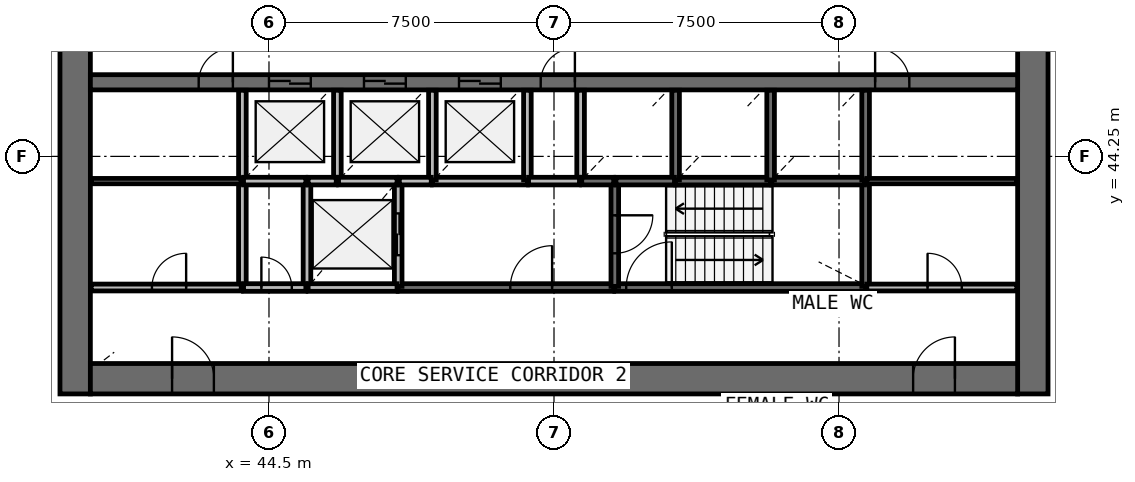
"""IFC4 building model, lengths in metres.
Left out: names, types, materials, properties, quantities, classifications, styles, units other than length and angle.
Written with IfcOpenShell. Run it as: python <this file> out.ifc"""

import sys

from ifc_helpers import new_model, si_unit, direction, frame, frame_2d, origin, place, context, subcontext, project, spatial, rectangle, extrude, source, transform, mapped, element, fill, save


model = new_model("IFC4")
c1 = context("Model", 3, precision=1e-05, world=origin(), true_north=direction((0.0, 1.0)))
c2 = subcontext(c1, "Body", "Model", "MODEL_VIEW")
j1 = project(units=[si_unit("LENGTHUNIT", "METRE"), si_unit("PLANEANGLEUNIT", "RADIAN")], contexts=[c1])
p1 = place(None, origin())
s1 = spatial("IfcSite", under=j1, at=p1, CompositionType="ELEMENT")
p2 = place(p1, origin())
s2 = spatial("IfcBuilding", under=s1, at=p2, CompositionType="ELEMENT")
p3 = place(p2, frame((0.0, 0.0, 104.4)))
s3 = spatial("IfcBuildingStorey", under=s2, at=p3, CompositionType="ELEMENT", Elevation=104.4)
p4 = place(p3, frame((64.6, 38.0, 0.0), z_axis=(0.0, 0.0, 1.0), x_axis=(0.0, 1.0, 0.0)))
e1 = element("IfcWall", 1, at=p4, inside=s3, PredefinedType="SHEAR", context=c2, shape_type="SweptSolid", body=[
    extrude(rectangle(XDim=20.0, YDim=0.8, at=frame_2d((10.0, 0.0))), origin(), (0.0, 0.0, 1.0), 4.1),
])
p5 = place(p4, frame((9.1, 0.0, 0.0)))
e2 = element("IfcOpeningElement", 2, at=p5, cuts=e1, PredefinedType="OPENING", context=c2, shape_type="SweptSolid", body=[
    extrude(rectangle(XDim=1.8, YDim=2.1, at=frame_2d((0.9, 1.05))), frame((0.0, 0.41, 0.0), z_axis=(0.0, -1.0, 0.0), x_axis=(1.0, 0.0, 0.0)), (0.0, 0.0, 1.0), 0.82),
])
p6 = place(p3, frame((39.4, 58.0, 0.0), z_axis=(0.0, 0.0, 1.0), x_axis=(0.0, -1.0, 0.0)))
e3 = element("IfcWall", 3, at=p6, inside=s3, PredefinedType="SHEAR", context=c2, shape_type="SweptSolid", body=[
    extrude(rectangle(XDim=20.0, YDim=0.8, at=frame_2d((10.0, 0.0))), origin(), (0.0, 0.0, 1.0), 4.1),
])
p7 = place(p6, frame((9.1, 0.0, 0.0)))
e4 = element("IfcOpeningElement", 4, at=p7, cuts=e3, PredefinedType="OPENING", context=c2, shape_type="SweptSolid", body=[
    extrude(rectangle(XDim=1.8, YDim=2.1, at=frame_2d((0.9, 1.05))), frame((0.0, 0.41, 0.0), z_axis=(0.0, -1.0, 0.0), x_axis=(1.0, 0.0, 0.0)), (0.0, 0.0, 1.0), 0.82),
])
p8 = place(p3, frame((39.8, 38.4, 0.0), z_axis=(0.0, 0.0, 1.0), x_axis=(1.0, 0.0, 0.0)))
e5 = element("IfcWall", 5, at=p8, inside=s3, PredefinedType="SHEAR", context=c2, shape_type="SweptSolid", body=[
    extrude(rectangle(XDim=24.4, YDim=0.8, at=frame_2d((12.2, 0.0))), origin(), (0.0, 0.0, 1.0), 4.1),
])
p9 = place(p8, frame((21.65, 0.0, 0.0)))
e6 = element("IfcOpeningElement", 6, at=p9, cuts=e5, PredefinedType="OPENING", context=c2, shape_type="SweptSolid", body=[
    extrude(rectangle(XDim=1.1, YDim=2.1, at=frame_2d((0.55, 1.05))), frame((0.0, 0.41, 0.0), z_axis=(0.0, -1.0, 0.0), x_axis=(1.0, 0.0, 0.0)), (0.0, 0.0, 1.0), 0.82),
])
p10 = place(p8, frame((2.15, 0.0, 0.0)))
e7 = element("IfcOpeningElement", 7, at=p10, cuts=e5, PredefinedType="OPENING", context=c2, shape_type="SweptSolid", body=[
    extrude(rectangle(XDim=1.1, YDim=2.1, at=frame_2d((0.55, 1.05))), frame((0.0, 0.41, 0.0), z_axis=(0.0, -1.0, 0.0), x_axis=(1.0, 0.0, 0.0)), (0.0, 0.0, 1.0), 0.82),
])
p11 = place(p3, frame((39.8, 46.2, 0.0), z_axis=(0.0, 0.0, 1.0), x_axis=(1.0, 0.0, 0.0)))
e8 = element("IfcWall", 8, at=p11, inside=s3, PredefinedType="SHEAR", context=c2, shape_type="SweptSolid", body=[
    extrude(rectangle(XDim=24.4, YDim=0.4, at=frame_2d((12.2, 0.0))), origin(), (0.0, 0.0, 1.0), 4.1),
])
p12 = place(p11, frame((4.7, 0.0, 0.0)))
e9 = element("IfcOpeningElement", 9, at=p12, cuts=e8, PredefinedType="OPENING", context=c2, shape_type="SweptSolid", body=[
    extrude(rectangle(XDim=1.1, YDim=2.1, at=frame_2d((0.55, 1.05))), frame((0.0, 0.21, 0.0), z_axis=(0.0, -1.0, 0.0), x_axis=(1.0, 0.0, 0.0)), (0.0, 0.0, 1.0), 0.42),
])
p13 = place(p11, frame((7.2, 0.0, 0.0)))
e10 = element("IfcOpeningElement", 10, at=p13, cuts=e8, PredefinedType="OPENING", context=c2, shape_type="SweptSolid", body=[
    extrude(rectangle(XDim=1.1, YDim=2.1, at=frame_2d((0.55, 1.05))), frame((0.0, 0.21, 0.0), z_axis=(0.0, -1.0, 0.0), x_axis=(1.0, 0.0, 0.0)), (0.0, 0.0, 1.0), 0.42),
])
p14 = place(p11, frame((9.7, 0.0, 0.0)))
e11 = element("IfcOpeningElement", 11, at=p14, cuts=e8, PredefinedType="OPENING", context=c2, shape_type="SweptSolid", body=[
    extrude(rectangle(XDim=1.1, YDim=2.1, at=frame_2d((0.55, 1.05))), frame((0.0, 0.21, 0.0), z_axis=(0.0, -1.0, 0.0), x_axis=(1.0, 0.0, 0.0)), (0.0, 0.0, 1.0), 0.42),
])
p15 = place(p11, frame((20.65, 0.0, 0.0)))
e12 = element("IfcOpeningElement", 12, at=p15, cuts=e8, PredefinedType="OPENING", context=c2, shape_type="SweptSolid", body=[
    extrude(rectangle(XDim=0.9, YDim=2.1, at=frame_2d((0.45, 1.05))), frame((0.0, 0.21, 0.0), z_axis=(0.0, -1.0, 0.0), x_axis=(1.0, 0.0, 0.0)), (0.0, 0.0, 1.0), 0.42),
])
p16 = place(p11, frame((2.85, 0.0, 0.0)))
e13 = element("IfcOpeningElement", 13, at=p16, cuts=e8, PredefinedType="OPENING", context=c2, shape_type="SweptSolid", body=[
    extrude(rectangle(XDim=0.9, YDim=2.1, at=frame_2d((0.45, 1.05))), frame((0.0, 0.21, 0.0), z_axis=(0.0, -1.0, 0.0), x_axis=(1.0, 0.0, 0.0)), (0.0, 0.0, 1.0), 0.42),
])
p17 = place(p11, frame((11.85, 0.0, 0.0)))
e14 = element("IfcOpeningElement", 14, at=p17, cuts=e8, PredefinedType="OPENING", context=c2, shape_type="SweptSolid", body=[
    extrude(rectangle(XDim=0.9, YDim=2.1, at=frame_2d((0.45, 1.05))), frame((0.0, 0.21, 0.0), z_axis=(0.0, -1.0, 0.0), x_axis=(1.0, 0.0, 0.0)), (0.0, 0.0, 1.0), 0.42),
])
p18 = place(p3, frame((53.6, 40.8, 0.0), z_axis=(0.0, 0.0, 1.0), x_axis=(1.0, 0.0, 0.0)))
e15 = element("IfcWall", 15, at=p18, inside=s3, PredefinedType="SOLIDWALL", context=c2, shape_type="SweptSolid", body=[
    extrude(rectangle(XDim=6.6, YDim=0.2, at=frame_2d((3.3, 0.0))), origin(), (0.0, 0.0, 1.0), 3.7),
])
p19 = place(p18, frame((0.3, 0.0, 0.0)))
e16 = element("IfcOpeningElement", 16, at=p19, cuts=e15, PredefinedType="OPENING", context=c2, shape_type="SweptSolid", body=[
    extrude(rectangle(XDim=1.2, YDim=2.1, at=frame_2d((0.6, 1.05))), frame((0.0, 0.11, 0.0), z_axis=(0.0, -1.0, 0.0), x_axis=(1.0, 0.0, 0.0)), (0.0, 0.0, 1.0), 0.22),
])
p20 = place(p3, frame((47.9, 40.8, 0.0), z_axis=(0.0, 0.0, 1.0), x_axis=(1.0, 0.0, 0.0)))
e17 = element("IfcWall", 17, at=p20, inside=s3, PredefinedType="SOLIDWALL", context=c2, shape_type="SweptSolid", body=[
    extrude(rectangle(XDim=5.67, YDim=0.2, at=frame_2d((2.835, 0.0))), origin(), (0.0, 0.0, 1.0), 3.7),
])
p21 = place(p20, frame((2.95, 0.0, 0.0)))
e18 = element("IfcOpeningElement", 18, at=p21, cuts=e17, PredefinedType="OPENING", context=c2, shape_type="SweptSolid", body=[
    extrude(rectangle(XDim=1.1, YDim=2.1, at=frame_2d((0.55, 1.05))), frame((0.0, 0.11, 0.0), z_axis=(0.0, -1.0, 0.0), x_axis=(1.0, 0.0, 0.0)), (0.0, 0.0, 1.0), 0.22),
])
for number, where, z_axis, x_axis in (
    (19, (43.8, 43.6, 0.0), (0.0, 0.0, 1.0), (0.0, -1.0, 0.0)),
    (20, (45.5, 43.6, 0.0), (0.0, 0.0, 1.0), (0.0, -1.0, 0.0)),
):
    element("IfcWall", number, at=place(p3, frame(where, z_axis=z_axis, x_axis=x_axis)), inside=s3, PredefinedType="SOLIDWALL", context=c2, shape_type="SweptSolid", body=[
        extrude(rectangle(XDim=2.8, YDim=0.2, at=frame_2d((1.4, 0.0))), origin(), (0.0, 0.0, 1.0), 3.7),
    ])
p22 = place(p3, frame((47.9, 40.83, 0.0), z_axis=(0.0, 0.0, 1.0), x_axis=(0.0, 1.0, 0.0)))
e21 = element("IfcWall", 21, at=p22, inside=s3, PredefinedType="SOLIDWALL", context=c2, shape_type="SweptSolid", body=[
    extrude(rectangle(XDim=2.77, YDim=0.2, at=frame_2d((1.385, 0.0))), origin(), (0.0, 0.0, 1.0), 3.7),
])
p23 = place(p22, frame((0.82, 0.0, 0.0)))
e22 = element("IfcOpeningElement", 22, at=p23, cuts=e21, PredefinedType="OPENING", context=c2, shape_type="SweptSolid", body=[
    extrude(rectangle(XDim=1.1, YDim=2.1, at=frame_2d((0.55, 1.05))), frame((0.0, 0.11, 0.0), z_axis=(0.0, -1.0, 0.0), x_axis=(1.0, 0.0, 0.0)), (0.0, 0.0, 1.0), 0.22),
])
p24 = place(p3, frame((60.2, 40.83, 0.0), z_axis=(0.0, 0.0, 1.0), x_axis=(0.0, 1.0, 0.0)))
e23 = element("IfcWall", 23, at=p24, inside=s3, PredefinedType="SOLIDWALL", context=c2, shape_type="SweptSolid", body=[
    extrude(rectangle(XDim=2.77, YDim=0.2, at=frame_2d((1.385, 0.0))), origin(), (0.0, 0.0, 1.0), 3.7),
])
p25 = place(p3, frame((53.6, 43.6, 0.0), z_axis=(0.0, 0.0, 1.0), x_axis=(0.0, -1.0, 0.0)))
e24 = element("IfcWall", 24, at=p25, inside=s3, PredefinedType="SOLIDWALL", context=c2, shape_type="SweptSolid", body=[
    extrude(rectangle(XDim=2.77, YDim=0.2, at=frame_2d((1.385, 0.0))), origin(), (0.0, 0.0, 1.0), 3.7),
])
p26 = place(p25, frame((0.9, 0.0, 0.0)))
e25 = element("IfcOpeningElement", 25, at=p26, cuts=e24, PredefinedType="OPENING", context=c2, shape_type="SweptSolid", body=[
    extrude(rectangle(XDim=1.0, YDim=2.1, at=frame_2d((0.5, 1.05))), frame((0.0, 0.11, 0.0), z_axis=(0.0, -1.0, 0.0), x_axis=(1.0, 0.0, 0.0)), (0.0, 0.0, 1.0), 0.22),
])
for number, where, z_axis, x_axis in (
    (26, (48.8, 43.6, 0.0), (0.0, 0.0, 1.0), (1.0, 0.0, 0.0)),
    (27, (55.2, 43.6, 0.0), (0.0, 0.0, 1.0), (1.0, 0.0, 0.0)),
):
    element("IfcWall", number, at=place(p3, frame(where, z_axis=z_axis, x_axis=x_axis)), inside=s3, PredefinedType="SOLIDWALL", context=c2, shape_type="SweptSolid", body=[
        extrude(rectangle(XDim=2.5, YDim=0.2, at=frame_2d((1.25, 0.0))), origin(), (0.0, 0.0, 1.0), 3.7),
    ])
p27 = place(p3, frame((57.73, 43.6, 0.0), z_axis=(0.0, 0.0, 1.0), x_axis=(1.0, 0.0, 0.0)))
e28 = element("IfcWall", 28, at=p27, inside=s3, PredefinedType="SOLIDWALL", context=c2, shape_type="SweptSolid", body=[
    extrude(rectangle(XDim=2.44, YDim=0.2, at=frame_2d((1.22, 0.0))), origin(), (0.0, 0.0, 1.0), 3.7),
])
p28 = place(p3, frame((45.53, 40.8, 0.0), z_axis=(0.0, 0.0, 1.0), x_axis=(1.0, 0.0, 0.0)))
e29 = element("IfcWall", 29, at=p28, inside=s3, PredefinedType="SOLIDWALL", context=c2, shape_type="SweptSolid", body=[
    extrude(rectangle(XDim=2.34, YDim=0.2, at=frame_2d((1.17, 0.0))), origin(), (0.0, 0.0, 1.0), 3.7),
])
p29 = place(p3, frame((43.8, 45.99, 0.0), z_axis=(0.0, 0.0, 1.0), x_axis=(0.0, -1.0, 0.0)))
e30 = element("IfcWall", 30, at=p29, inside=s3, PredefinedType="SOLIDWALL", context=c2, shape_type="SweptSolid", body=[
    extrude(rectangle(XDim=2.36, YDim=0.2, at=frame_2d((1.18, 0.0))), origin(), (0.0, 0.0, 1.0), 3.7),
])
p30 = place(p3, frame((46.3, 43.6, 0.0), z_axis=(0.0, 0.0, 1.0), x_axis=(0.0, 1.0, 0.0)))
e31 = element("IfcWall", 31, at=p30, inside=s3, PredefinedType="SOLIDWALL", context=c2, shape_type="SweptSolid", body=[
    extrude(rectangle(XDim=2.39, YDim=0.2, at=frame_2d((1.195, 0.0))), origin(), (0.0, 0.0, 1.0), 3.7),
])
for number, where, z_axis, x_axis in (
    (32, (48.8, 43.63, 0.0), (0.0, 0.0, 1.0), (0.0, 1.0, 0.0)),
    (33, (51.3, 43.63, 0.0), (0.0, 0.0, 1.0), (0.0, 1.0, 0.0)),
):
    element("IfcWall", number, at=place(p3, frame(where, z_axis=z_axis, x_axis=x_axis)), inside=s3, PredefinedType="SOLIDWALL", context=c2, shape_type="SweptSolid", body=[
        extrude(rectangle(XDim=2.36, YDim=0.2, at=frame_2d((1.18, 0.0))), origin(), (0.0, 0.0, 1.0), 3.7),
    ])
p31 = place(p3, frame((52.7, 45.99, 0.0), z_axis=(0.0, 0.0, 1.0), x_axis=(0.0, -1.0, 0.0)))
e34 = element("IfcWall", 34, at=p31, inside=s3, PredefinedType="SOLIDWALL", context=c2, shape_type="SweptSolid", body=[
    extrude(rectangle(XDim=2.39, YDim=0.2, at=frame_2d((1.195, 0.0))), origin(), (0.0, 0.0, 1.0), 3.7),
])
for number, where, z_axis, x_axis in (
    (35, (55.2, 43.63, 0.0), (0.0, 0.0, 1.0), (0.0, 1.0, 0.0)),
    (36, (57.7, 43.63, 0.0), (0.0, 0.0, 1.0), (0.0, 1.0, 0.0)),
    (37, (60.2, 43.63, 0.0), (0.0, 0.0, 1.0), (0.0, 1.0, 0.0)),
):
    element("IfcWall", number, at=place(p3, frame(where, z_axis=z_axis, x_axis=x_axis)), inside=s3, PredefinedType="SOLIDWALL", context=c2, shape_type="SweptSolid", body=[
        extrude(rectangle(XDim=2.36, YDim=0.2, at=frame_2d((1.18, 0.0))), origin(), (0.0, 0.0, 1.0), 3.7),
    ])
p32 = place(p3, frame((43.83, 43.6, 0.0), z_axis=(0.0, 0.0, 1.0), x_axis=(1.0, 0.0, 0.0)))
e38 = element("IfcWall", 38, at=p32, inside=s3, PredefinedType="SOLIDWALL", context=c2, shape_type="SweptSolid", body=[
    extrude(rectangle(XDim=1.64, YDim=0.2, at=frame_2d((0.82, 0.0))), origin(), (0.0, 0.0, 1.0), 3.7),
])
p33 = place(p3, frame((43.83, 40.8, 0.0), z_axis=(0.0, 0.0, 1.0), x_axis=(1.0, 0.0, 0.0)))
e39 = element("IfcWall", 39, at=p33, inside=s3, PredefinedType="SOLIDWALL", context=c2, shape_type="SweptSolid", body=[
    extrude(rectangle(XDim=1.64, YDim=0.2, at=frame_2d((0.82, 0.0))), origin(), (0.0, 0.0, 1.0), 3.7),
])
p34 = place(p33, frame((0.47, 0.0, 0.0)))
e40 = element("IfcOpeningElement", 40, at=p34, cuts=e39, PredefinedType="OPENING", context=c2, shape_type="SweptSolid", body=[
    extrude(rectangle(XDim=0.8, YDim=2.1, at=frame_2d((0.4, 1.05))), frame((0.0, 0.11, 0.0), z_axis=(0.0, -1.0, 0.0), x_axis=(1.0, 0.0, 0.0)), (0.0, 0.0, 1.0), 0.22),
])
for number, where, z_axis, x_axis in (
    (41, (46.33, 43.6, 0.0), (0.0, 0.0, 1.0), (1.0, 0.0, 0.0)),
    (42, (53.63, 43.6, 0.0), (0.0, 0.0, 1.0), (1.0, 0.0, 0.0)),
):
    element("IfcWall", number, at=place(p3, frame(where, z_axis=z_axis, x_axis=x_axis)), inside=s3, PredefinedType="SOLIDWALL", context=c2, shape_type="SweptSolid", body=[
        extrude(rectangle(XDim=1.54, YDim=0.2, at=frame_2d((0.77, 0.0))), origin(), (0.0, 0.0, 1.0), 3.7),
    ])
p35 = place(p3, frame((52.67, 43.6, 0.0), z_axis=(0.0, 0.0, 1.0), x_axis=(-1.0, 0.0, 0.0)))
e43 = element("IfcWall", 43, at=p35, inside=s3, PredefinedType="SOLIDWALL", context=c2, shape_type="SweptSolid", body=[
    extrude(rectangle(XDim=1.34, YDim=0.2, at=frame_2d((0.67, 0.0))), origin(), (0.0, 0.0, 1.0), 3.7),
])
for number, where, z_axis, x_axis in (
    (44, (47.93, 43.6, 0.0), (0.0, 0.0, 1.0), (1.0, 0.0, 0.0)),
    (45, (52.73, 43.6, 0.0), (0.0, 0.0, 1.0), (1.0, 0.0, 0.0)),
):
    element("IfcWall", number, at=place(p3, frame(where, z_axis=z_axis, x_axis=x_axis)), inside=s3, PredefinedType="SOLIDWALL", context=c2, shape_type="SweptSolid", body=[
        extrude(rectangle(XDim=0.84, YDim=0.2, at=frame_2d((0.42, 0.0))), origin(), (0.0, 0.0, 1.0), 3.7),
    ])
p36 = place(p3, frame((45.53, 43.6, 0.0), z_axis=(0.0, 0.0, 1.0), x_axis=(1.0, 0.0, 0.0)))
e46 = element("IfcWall", 46, at=p36, inside=s3, PredefinedType="SOLIDWALL", context=c2, shape_type="SweptSolid", body=[
    extrude(rectangle(XDim=0.74, YDim=0.2, at=frame_2d((0.37, 0.0))), origin(), (0.0, 0.0, 1.0), 3.7),
])
p37 = place(p3, frame((60.23, 40.8, 0.0), z_axis=(0.0, 0.0, 1.0), x_axis=(1.0, 0.0, 0.0)))
e47 = element("IfcWall", 47, at=p37, inside=s3, PredefinedType="PARTITIONING", context=c2, shape_type="SweptSolid", body=[
    extrude(rectangle(XDim=3.95, YDim=0.18, at=frame_2d((1.975, 0.0))), origin(), (0.0, 0.0, 1.0), 3.7),
])
p38 = place(p37, frame((1.6, 0.0, 0.0)))
e48 = element("IfcOpeningElement", 48, at=p38, cuts=e47, PredefinedType="OPENING", context=c2, shape_type="SweptSolid", body=[
    extrude(rectangle(XDim=0.9, YDim=2.1, at=frame_2d((0.45, 1.05))), frame((0.0, 0.1, 0.0), z_axis=(0.0, -1.0, 0.0), x_axis=(1.0, 0.0, 0.0)), (0.0, 0.0, 1.0), 0.2),
])
p39 = place(p3, frame((39.82, 40.8, 0.0), z_axis=(0.0, 0.0, 1.0), x_axis=(1.0, 0.0, 0.0)))
e49 = element("IfcWall", 49, at=p39, inside=s3, PredefinedType="PARTITIONING", context=c2, shape_type="SweptSolid", body=[
    extrude(rectangle(XDim=3.95, YDim=0.18, at=frame_2d((1.975, 0.0))), origin(), (0.0, 0.0, 1.0), 3.7),
])
p40 = place(p39, frame((1.6, 0.0, 0.0)))
e50 = element("IfcOpeningElement", 50, at=p40, cuts=e49, PredefinedType="OPENING", context=c2, shape_type="SweptSolid", body=[
    extrude(rectangle(XDim=0.9, YDim=2.1, at=frame_2d((0.45, 1.05))), frame((0.0, 0.1, 0.0), z_axis=(0.0, -1.0, 0.0), x_axis=(1.0, 0.0, 0.0)), (0.0, 0.0, 1.0), 0.2),
])
for number, where, z_axis, x_axis in (
    (51, (60.23, 43.6, 0.0), (0.0, 0.0, 1.0), (1.0, 0.0, 0.0)),
    (52, (43.77, 43.6, 0.0), (0.0, 0.0, 1.0), (-1.0, 0.0, 0.0)),
):
    element("IfcWall", number, at=place(p3, frame(where, z_axis=z_axis, x_axis=x_axis)), inside=s3, PredefinedType="PARTITIONING", context=c2, shape_type="SweptSolid", body=[
        extrude(rectangle(XDim=3.95, YDim=0.14, at=frame_2d((1.975, 0.0))), origin(), (0.0, 0.0, 1.0), 2.9),
    ])
m1 = source(origin(), c2, "Body", "SweptSolid", [
    extrude(rectangle(XDim=1.1, YDim=2.1, at=frame_2d((0.55, 1.05))), frame((0.0, 0.025, 0.0), z_axis=(0.0, -1.0, 0.0), x_axis=(1.0, 0.0, 0.0)), (0.0, 0.0, 1.0), 0.05),
])
p41 = place(p12, origin())
e53 = element("IfcDoor", 53, at=p41, inside=s3, OperationType="DOUBLE_DOOR_SLIDING", PredefinedType="USERDEFINED", context=c2, shape_type="MappedRepresentation", body=[
    mapped(m1, transform((0.0, 0.0, 0.0), scale=1.0)),
])
fill(e9, e53)
p42 = place(p13, origin())
e54 = element("IfcDoor", 54, at=p42, inside=s3, OperationType="DOUBLE_DOOR_SLIDING", PredefinedType="USERDEFINED", context=c2, shape_type="MappedRepresentation", body=[
    mapped(m1, transform((0.0, 0.0, 0.0), scale=1.0)),
])
fill(e10, e54)
p43 = place(p14, origin())
e55 = element("IfcDoor", 55, at=p43, inside=s3, OperationType="DOUBLE_DOOR_SLIDING", PredefinedType="USERDEFINED", context=c2, shape_type="MappedRepresentation", body=[
    mapped(m1, transform((0.0, 0.0, 0.0), scale=1.0)),
])
fill(e11, e55)
p44 = place(p23, origin())
e56 = element("IfcDoor", 56, at=p44, inside=s3, OperationType="DOUBLE_DOOR_SLIDING", PredefinedType="USERDEFINED", context=c2, shape_type="MappedRepresentation", body=[
    mapped(m1, transform((0.0, 0.0, 0.0), scale=1.0)),
])
fill(e22, e56)
m2 = source(origin(), c2, "Body", "SweptSolid", [
    extrude(rectangle(XDim=1.2, YDim=2.1, at=frame_2d((0.6, 1.05))), frame((0.0, 0.025, 0.0), z_axis=(0.0, -1.0, 0.0), x_axis=(1.0, 0.0, 0.0)), (0.0, 0.0, 1.0), 0.05),
])
p45 = place(p19, origin())
e57 = element("IfcDoor", 57, at=p45, inside=s3, OperationType="SINGLE_SWING_RIGHT", PredefinedType="DOOR", context=c2, shape_type="MappedRepresentation", body=[
    mapped(m2, transform((0.0, 0.0, 0.0), scale=1.0)),
])
fill(e16, e57)
m3 = source(origin(), c2, "Body", "SweptSolid", [
    extrude(rectangle(XDim=1.0, YDim=2.1, at=frame_2d((0.5, 1.05))), frame((0.0, 0.025, 0.0), z_axis=(0.0, -1.0, 0.0), x_axis=(1.0, 0.0, 0.0)), (0.0, 0.0, 1.0), 0.05),
])
p46 = place(p26, origin())
e58 = element("IfcDoor", 58, at=p46, inside=s3, OperationType="SINGLE_SWING_LEFT", PredefinedType="DOOR", context=c2, shape_type="MappedRepresentation", body=[
    mapped(m3, transform((0.0, 0.0, 0.0), scale=1.0)),
])
fill(e25, e58)
m4 = source(origin(), c2, "Body", "SweptSolid", [
    extrude(rectangle(XDim=1.1, YDim=2.1, at=frame_2d((0.55, 1.05))), frame((0.0, 0.025, 0.0), z_axis=(0.0, -1.0, 0.0), x_axis=(1.0, 0.0, 0.0)), (0.0, 0.0, 1.0), 0.05),
])
p47 = place(p21, origin())
e59 = element("IfcDoor", 59, at=p47, inside=s3, OperationType="SINGLE_SWING_RIGHT", PredefinedType="DOOR", context=c2, shape_type="MappedRepresentation", body=[
    mapped(m4, transform((0.0, 0.0, 0.0), scale=1.0)),
])
fill(e18, e59)
m5 = source(origin(), c2, "Body", "SweptSolid", [
    extrude(rectangle(XDim=0.8, YDim=2.1, at=frame_2d((0.4, 1.05))), frame((0.0, 0.025, 0.0), z_axis=(0.0, -1.0, 0.0), x_axis=(1.0, 0.0, 0.0)), (0.0, 0.0, 1.0), 0.05),
])
p48 = place(p34, origin())
e60 = element("IfcDoor", 60, at=p48, inside=s3, OperationType="SINGLE_SWING_LEFT", PredefinedType="DOOR", context=c2, shape_type="MappedRepresentation", body=[
    mapped(m5, transform((0.0, 0.0, 0.0), scale=1.0)),
])
fill(e40, e60)
m6 = source(origin(), c2, "Body", "SweptSolid", [
    extrude(rectangle(XDim=1.1, YDim=2.1, at=frame_2d((0.55, 1.05))), frame((0.0, 0.025, 0.0), z_axis=(0.0, -1.0, 0.0), x_axis=(1.0, 0.0, 0.0)), (0.0, 0.0, 1.0), 0.05),
])
p49 = place(p9, origin())
e61 = element("IfcDoor", 61, at=p49, inside=s3, OperationType="SINGLE_SWING_RIGHT", PredefinedType="DOOR", context=c2, shape_type="MappedRepresentation", body=[
    mapped(m6, transform((0.0, 0.0, 0.0), scale=1.0)),
])
fill(e6, e61)
p50 = place(p10, origin())
e62 = element("IfcDoor", 62, at=p50, inside=s3, OperationType="SINGLE_SWING_LEFT", PredefinedType="DOOR", context=c2, shape_type="MappedRepresentation", body=[
    mapped(m6, transform((0.0, 0.0, 0.0), scale=1.0)),
])
fill(e7, e62)
m7 = source(origin(), c2, "Body", "SweptSolid", [
    extrude(rectangle(XDim=0.9, YDim=2.1, at=frame_2d((0.45, 1.05))), frame((0.0, 0.025, 0.0), z_axis=(0.0, -1.0, 0.0), x_axis=(1.0, 0.0, 0.0)), (0.0, 0.0, 1.0), 0.05),
])
p51 = place(p40, origin())
e63 = element("IfcDoor", 63, at=p51, inside=s3, OperationType="SINGLE_SWING_RIGHT", PredefinedType="DOOR", context=c2, shape_type="MappedRepresentation", body=[
    mapped(m7, transform((0.0, 0.0, 0.0), scale=1.0)),
])
fill(e50, e63)
p52 = place(p15, origin())
e64 = element("IfcDoor", 64, at=p52, inside=s3, OperationType="SINGLE_SWING_LEFT", PredefinedType="DOOR", context=c2, shape_type="MappedRepresentation", body=[
    mapped(m7, transform((0.0, 0.0, 0.0), scale=1.0)),
])
fill(e12, e64)
p53 = place(p38, origin())
e65 = element("IfcDoor", 65, at=p53, inside=s3, OperationType="SINGLE_SWING_LEFT", PredefinedType="DOOR", context=c2, shape_type="MappedRepresentation", body=[
    mapped(m7, transform((0.0, 0.0, 0.0), scale=1.0)),
])
fill(e48, e65)
p54 = place(p16, origin())
e66 = element("IfcDoor", 66, at=p54, inside=s3, OperationType="SINGLE_SWING_RIGHT", PredefinedType="DOOR", context=c2, shape_type="MappedRepresentation", body=[
    mapped(m7, transform((0.0, 0.0, 0.0), scale=1.0)),
])
fill(e13, e66)
p55 = place(p17, origin())
e67 = element("IfcDoor", 67, at=p55, inside=s3, OperationType="SINGLE_SWING_RIGHT", PredefinedType="DOOR", context=c2, shape_type="MappedRepresentation", body=[
    mapped(m7, transform((0.0, 0.0, 0.0), scale=1.0)),
])
fill(e14, e67)
save(model, sys.argv[1])
